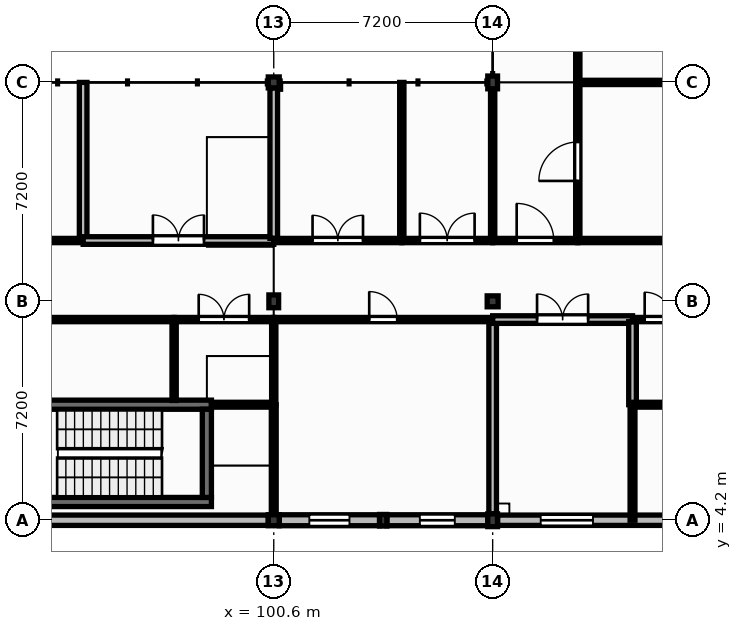
"""IFC4 building model, lengths in metres.
Left out: names, types, materials, properties, quantities, classifications, styles, units other than length and angle.
Written with IfcOpenShell. Run it as: python <this file> out.ifc"""

import sys

from ifc_helpers import new_model, si_unit, direction, frame, frame_2d, origin, origin_2d, place, context, subcontext, project, spatial, rectangle, extrude, element, fill, save


model = new_model("IFC4")
c1 = context("Model", 3, precision=1e-05, world=origin(), true_north=direction((0.0, 1.0)))
c2 = subcontext(c1, "Body", "Model", "MODEL_VIEW")
j1 = project(units=[si_unit("LENGTHUNIT", "METRE"), si_unit("PLANEANGLEUNIT", "RADIAN")], contexts=[c1])
p1 = place(None, origin())
s1 = spatial("IfcSite", under=j1, at=p1, CompositionType="ELEMENT")
p2 = place(p1, origin())
s2 = spatial("IfcBuilding", under=s1, at=p2, CompositionType="ELEMENT")
p3 = place(p2, frame((0.0, 0.0, 4.5)))
s3 = spatial("IfcBuildingStorey", under=s2, at=p3, CompositionType="ELEMENT", Elevation=4.5)
p4 = place(p3, frame((100.6, 4.2, 0.0), z_axis=(0.0, 0.0, 1.0), x_axis=(1.0, 0.0, 0.0)))
e1 = element("IfcColumn", 1, at=p4, inside=s3, PredefinedType="COLUMN", context=c2, shape_type="SweptSolid", body=[
    extrude(rectangle(XDim=0.36, YDim=0.36, at=origin_2d()), origin(), (0.0, 0.0, 1.0), 4.26),
])
p5 = place(p3, frame((100.6, 11.4, 0.0), z_axis=(0.0, 0.0, 1.0), x_axis=(1.0, 0.0, 0.0)))
e2 = element("IfcColumn", 2, at=p5, inside=s3, PredefinedType="COLUMN", context=c2, shape_type="SweptSolid", body=[
    extrude(rectangle(XDim=0.32, YDim=0.42, at=origin_2d()), origin(), (0.0, 0.0, 1.0), 4.26),
])
p6 = place(p3, frame((100.6, 18.6, 0.0), z_axis=(0.0, 0.0, 1.0), x_axis=(1.0, 0.0, 0.0)))
e3 = element("IfcColumn", 3, at=p6, inside=s3, PredefinedType="COLUMN", context=c2, shape_type="SweptSolid", body=[
    extrude(rectangle(XDim=0.36, YDim=0.36, at=origin_2d()), origin(), (0.0, 0.0, 1.0), 4.26),
])
p7 = place(p3, frame((107.8, 4.2, 0.0), z_axis=(0.0, 0.0, 1.0), x_axis=(1.0, 0.0, 0.0)))
e4 = element("IfcColumn", 4, at=p7, inside=s3, PredefinedType="COLUMN", context=c2, shape_type="SweptSolid", body=[
    extrude(rectangle(XDim=0.32, YDim=0.42, at=origin_2d()), origin(), (0.0, 0.0, 1.0), 4.26),
])
p8 = place(p3, frame((107.8, 11.4, 0.0), z_axis=(0.0, 0.0, 1.0), x_axis=(1.0, 0.0, 0.0)))
e5 = element("IfcColumn", 5, at=p8, inside=s3, PredefinedType="COLUMN", context=c2, shape_type="SweptSolid", body=[
    extrude(rectangle(XDim=0.36, YDim=0.36, at=origin_2d()), origin(), (0.0, 0.0, 1.0), 4.26),
])
p9 = place(p3, frame((107.8, 18.6, 0.0), z_axis=(0.0, 0.0, 1.0), x_axis=(1.0, 0.0, 0.0)))
e6 = element("IfcColumn", 6, at=p9, inside=s3, PredefinedType="COLUMN", context=c2, shape_type="SweptSolid", body=[
    extrude(rectangle(XDim=0.32, YDim=0.42, at=origin_2d()), origin(), (0.0, 0.0, 1.0), 4.26),
])
p10 = place(p3, frame((104.2, 4.2, 0.0), z_axis=(0.0, 0.0, 1.0), x_axis=(1.0, 0.0, 0.0)))
e7 = element("IfcColumn", 7, at=p10, inside=s3, PredefinedType="PILASTER", context=c2, shape_type="SweptSolid", body=[
    extrude(rectangle(XDim=0.24, YDim=0.38, at=origin_2d()), origin(), (0.0, 0.0, 1.0), 4.26),
])
p11 = place(p3, frame((91.16, 4.2, 0.0), z_axis=(0.0, 0.0, 1.0), x_axis=(1.0, 0.0, 0.0)))
e8 = element("IfcWall", 8, at=p11, inside=s3, PredefinedType="SOLIDWALL", context=c2, shape_type="SweptSolid", body=[
    extrude(rectangle(XDim=9.26, YDim=0.34, at=frame_2d((4.63, 0.0))), origin(), (0.0, 0.0, 1.0), 3.8),
])
p12 = place(p3, frame((100.78, 4.2, 0.0), z_axis=(0.0, 0.0, 1.0), x_axis=(1.0, 0.0, 0.0)))
e9 = element("IfcWall", 9, at=p12, inside=s3, PredefinedType="SOLIDWALL", context=c2, shape_type="SweptSolid", body=[
    extrude(rectangle(XDim=3.3, YDim=0.36, at=frame_2d((1.65, 0.0))), origin(), (0.0, 0.0, 1.0), 3.8),
])
p13 = place(p12, frame((0.99, 0.0, 1.5)))
e10 = element("IfcOpeningElement", 10, at=p13, cuts=e9, PredefinedType="OPENING", context=c2, shape_type="SweptSolid", body=[
    extrude(rectangle(XDim=1.32, YDim=1.25, at=frame_2d((0.66, 0.625))), frame((0.0, 0.19, 0.0), z_axis=(0.0, -1.0, 0.0), x_axis=(1.0, 0.0, 0.0)), (0.0, 0.0, 1.0), 0.38),
])
p14 = place(p3, frame((104.32, 4.2, 0.0), z_axis=(0.0, 0.0, 1.0), x_axis=(1.0, 0.0, 0.0)))
e11 = element("IfcWall", 11, at=p14, inside=s3, PredefinedType="SOLIDWALL", context=c2, shape_type="SweptSolid", body=[
    extrude(rectangle(XDim=3.32, YDim=0.36, at=frame_2d((1.66, 0.0))), origin(), (0.0, 0.0, 1.0), 3.8),
])
p15 = place(p14, frame((1.085, 0.0, 1.5)))
e12 = element("IfcOpeningElement", 12, at=p15, cuts=e11, PredefinedType="OPENING", context=c2, shape_type="SweptSolid", body=[
    extrude(rectangle(XDim=1.15, YDim=1.25, at=frame_2d((0.575, 0.625))), frame((0.0, 0.19, 0.0), z_axis=(0.0, -1.0, 0.0), x_axis=(1.0, 0.0, 0.0)), (0.0, 0.0, 1.0), 0.38),
])
p16 = place(p3, frame((107.96, 4.2, 0.0), z_axis=(0.0, 0.0, 1.0), x_axis=(1.0, 0.0, 0.0)))
e13 = element("IfcWall", 13, at=p16, inside=s3, PredefinedType="SOLIDWALL", context=c2, shape_type="SweptSolid", body=[
    extrude(rectangle(XDim=6.79, YDim=0.34, at=frame_2d((3.395, 0.0))), origin(), (0.0, 0.0, 1.0), 3.76),
])
p17 = place(p16, frame((1.42, 0.0, 1.0)))
e14 = element("IfcOpeningElement", 14, at=p17, cuts=e13, PredefinedType="OPENING", context=c2, shape_type="SweptSolid", body=[
    extrude(rectangle(XDim=1.72, YDim=2.2, at=frame_2d((0.86, 1.1))), frame((0.0, 0.18, 0.0), z_axis=(0.0, -1.0, 0.0), x_axis=(1.0, 0.0, 0.0)), (0.0, 0.0, 1.0), 0.36),
])
for number, where, z_axis, x_axis in (
    (15, (91.85, 4.8, 0.0), (0.0, 0.0, 1.0), (1.0, 0.0, 0.0)),
    (16, (91.85, 8.0, 0.0), (0.0, 0.0, 1.0), (1.0, 0.0, 0.0)),
):
    element("IfcWall", number, at=place(p3, frame(where, z_axis=z_axis, x_axis=x_axis)), inside=s3, PredefinedType="SHEAR", context=c2, shape_type="SweptSolid", body=[
        extrude(rectangle(XDim=6.7, YDim=0.3, at=frame_2d((3.35, 0.0))), origin(), (0.0, 0.0, 1.0), 4.25),
    ])
p18 = place(p3, frame((98.4, 4.95, 0.0), z_axis=(0.0, 0.0, 1.0), x_axis=(0.0, 1.0, 0.0)))
e17 = element("IfcWall", 17, at=p18, inside=s3, PredefinedType="SHEAR", context=c2, shape_type="SweptSolid", body=[
    extrude(rectangle(XDim=2.9, YDim=0.3, at=frame_2d((1.45, 0.0))), origin(), (0.0, 0.0, 1.0), 4.25),
])
p19 = place(p3, frame((91.0, 13.4, 0.0), z_axis=(0.0, 0.0, 1.0), x_axis=(1.0, 0.0, 0.0)))
e18 = element("IfcWall", 18, at=p19, inside=s3, PredefinedType="PARTITIONING", context=c2, shape_type="SweptSolid", body=[
    extrude(rectangle(XDim=3.331, YDim=0.14, at=frame_2d((1.666, 0.0))), origin(), (0.0, 0.0, 1.0), 4.18),
])
p20 = place(p19, frame((1.146, 0.0, 0.0)))
e19 = element("IfcOpeningElement", 19, at=p20, cuts=e18, PredefinedType="OPENING", context=c2, shape_type="SweptSolid", body=[
    extrude(rectangle(XDim=1.04, YDim=2.1, at=frame_2d((0.52, 1.05))), frame((0.0, 0.08, 0.0), z_axis=(0.0, -1.0, 0.0), x_axis=(1.0, 0.0, 0.0)), (0.0, 0.0, 1.0), 0.16),
])
p21 = place(p3, frame((92.0, 10.8, 0.0), z_axis=(0.0, 0.0, 1.0), x_axis=(1.0, 0.0, 0.0)))
e20 = element("IfcWall", 20, at=p21, inside=s3, PredefinedType="PARTITIONING", context=c2, shape_type="SweptSolid", body=[
    extrude(rectangle(XDim=5.323, YDim=0.14, at=frame_2d((2.662, 0.0))), origin(), (0.0, 0.0, 1.0), 4.18),
])
p22 = place(p3, frame((94.331, 13.47, 0.0), z_axis=(0.0, 0.0, 1.0), x_axis=(0.0, 1.0, 0.0)))
e21 = element("IfcWall", 21, at=p22, inside=s3, PredefinedType="SOLIDWALL", context=c2, shape_type="SweptSolid", body=[
    extrude(rectangle(XDim=5.13, YDim=0.25, at=frame_2d((2.565, 0.0))), origin(), (0.0, 0.0, 1.0), 4.18),
])
p23 = place(p3, frame((94.331, 13.4, 0.0), z_axis=(0.0, 0.0, 1.0), x_axis=(1.0, 0.0, 0.0)))
e22 = element("IfcWall", 22, at=p23, inside=s3, PredefinedType="SOLIDWALL", context=c2, shape_type="SweptSolid", body=[
    extrude(rectangle(XDim=6.269, YDim=0.25, at=frame_2d((3.135, 0.0))), origin(), (0.0, 0.0, 1.0), 4.18),
])
p24 = place(p23, frame((2.294, 0.0, 0.0)))
e23 = element("IfcOpeningElement", 23, at=p24, cuts=e22, PredefinedType="OPENING", context=c2, shape_type="SweptSolid", body=[
    extrude(rectangle(XDim=1.68, YDim=2.3, at=frame_2d((0.84, 1.15))), frame((0.0, 0.135, 0.0), z_axis=(0.0, -1.0, 0.0), x_axis=(1.0, 0.0, 0.0)), (0.0, 0.0, 1.0), 0.27),
])
p25 = place(p3, frame((97.323, 8.14, 0.0), z_axis=(0.0, 0.0, 1.0), x_axis=(0.0, 1.0, 0.0)))
e24 = element("IfcWall", 24, at=p25, inside=s3, PredefinedType="PARTITIONING", context=c2, shape_type="SweptSolid", body=[
    extrude(rectangle(XDim=2.59, YDim=0.14, at=frame_2d((1.295, 0.0))), origin(), (0.0, 0.0, 1.0), 4.18),
])
p26 = place(p3, frame((97.323, 10.8, 0.0), z_axis=(0.0, 0.0, 1.0), x_axis=(1.0, 0.0, 0.0)))
e25 = element("IfcWall", 25, at=p26, inside=s3, PredefinedType="PARTITIONING", context=c2, shape_type="SweptSolid", body=[
    extrude(rectangle(XDim=3.277, YDim=0.14, at=frame_2d((1.639, 0.0))), origin(), (0.0, 0.0, 1.0), 4.18),
])
p27 = place(p26, frame((0.809, 0.0, 0.0)))
e26 = element("IfcOpeningElement", 26, at=p27, cuts=e25, PredefinedType="OPENING", context=c2, shape_type="SweptSolid", body=[
    extrude(rectangle(XDim=1.66, YDim=2.3, at=frame_2d((0.83, 1.15))), frame((0.0, 0.08, 0.0), z_axis=(0.0, -1.0, 0.0), x_axis=(1.0, 0.0, 0.0)), (0.0, 0.0, 1.0), 0.16),
])
p28 = place(p3, frame((100.6, 8.0, 0.0), z_axis=(0.0, 0.0, 1.0), x_axis=(0.0, 1.0, 0.0)))
e27 = element("IfcWall", 27, at=p28, inside=s3, PredefinedType="PARTITIONING", context=c2, shape_type="SweptSolid", body=[
    extrude(rectangle(XDim=2.73, YDim=0.14, at=frame_2d((1.365, 0.0))), origin(), (0.0, 0.0, 1.0), 3.74),
])
p29 = place(p3, frame((100.6, 10.8, 0.0), z_axis=(0.0, 0.0, 1.0), x_axis=(1.0, 0.0, 0.0)))
e28 = element("IfcWall", 28, at=p29, inside=s3, PredefinedType="PARTITIONING", context=c2, shape_type="SweptSolid", body=[
    extrude(rectangle(XDim=7.2, YDim=0.14, at=frame_2d((3.6, 0.0))), origin(), (0.0, 0.0, 1.0), 4.18),
])
p30 = place(p29, frame((3.14, 0.0, 0.0)))
e29 = element("IfcOpeningElement", 29, at=p30, cuts=e28, PredefinedType="OPENING", context=c2, shape_type="SweptSolid", body=[
    extrude(rectangle(XDim=0.92, YDim=2.1, at=frame_2d((0.46, 1.05))), frame((0.0, 0.08, 0.0), z_axis=(0.0, -1.0, 0.0), x_axis=(1.0, 0.0, 0.0)), (0.0, 0.0, 1.0), 0.16),
])
p31 = place(p3, frame((100.6, 13.47, 0.0), z_axis=(0.0, 0.0, 1.0), x_axis=(0.0, 1.0, 0.0)))
e30 = element("IfcWall", 30, at=p31, inside=s3, PredefinedType="SOLIDWALL", context=c2, shape_type="SweptSolid", body=[
    extrude(rectangle(XDim=4.95, YDim=0.25, at=frame_2d((2.475, 0.0))), origin(), (0.0, 0.0, 1.0), 3.74),
])
p32 = place(p3, frame((100.6, 13.4, 0.0), z_axis=(0.0, 0.0, 1.0), x_axis=(1.0, 0.0, 0.0)))
e31 = element("IfcWall", 31, at=p32, inside=s3, PredefinedType="PARTITIONING", context=c2, shape_type="SweptSolid", body=[
    extrude(rectangle(XDim=4.212, YDim=0.14, at=frame_2d((2.106, 0.0))), origin(), (0.0, 0.0, 1.0), 4.18),
])
p33 = place(p32, frame((1.276, 0.0, 0.0)))
e32 = element("IfcOpeningElement", 32, at=p33, cuts=e31, PredefinedType="OPENING", context=c2, shape_type="SweptSolid", body=[
    extrude(rectangle(XDim=1.66, YDim=2.3, at=frame_2d((0.83, 1.15))), frame((0.0, 0.08, 0.0), z_axis=(0.0, -1.0, 0.0), x_axis=(1.0, 0.0, 0.0)), (0.0, 0.0, 1.0), 0.16),
])
p34 = place(p3, frame((104.812, 13.47, 0.0), z_axis=(0.0, 0.0, 1.0), x_axis=(0.0, 1.0, 0.0)))
e33 = element("IfcWall", 33, at=p34, inside=s3, PredefinedType="PARTITIONING", context=c2, shape_type="SweptSolid", body=[
    extrude(rectangle(XDim=5.13, YDim=0.14, at=frame_2d((2.565, 0.0))), origin(), (0.0, 0.0, 1.0), 4.18),
])
p35 = place(p3, frame((104.812, 13.4, 0.0), z_axis=(0.0, 0.0, 1.0), x_axis=(1.0, 0.0, 0.0)))
e34 = element("IfcWall", 34, at=p35, inside=s3, PredefinedType="PARTITIONING", context=c2, shape_type="SweptSolid", body=[
    extrude(rectangle(XDim=2.988, YDim=0.14, at=frame_2d((1.494, 0.0))), origin(), (0.0, 0.0, 1.0), 4.18),
])
p36 = place(p35, frame((0.594, 0.0, 0.0)))
e35 = element("IfcOpeningElement", 35, at=p36, cuts=e34, PredefinedType="OPENING", context=c2, shape_type="SweptSolid", body=[
    extrude(rectangle(XDim=1.8, YDim=2.3, at=frame_2d((0.9, 1.15))), frame((0.0, 0.08, 0.0), z_axis=(0.0, -1.0, 0.0), x_axis=(1.0, 0.0, 0.0)), (0.0, 0.0, 1.0), 0.16),
])
p37 = place(p3, frame((107.8, 4.41, 0.0), z_axis=(0.0, 0.0, 1.0), x_axis=(0.0, 1.0, 0.0)))
e36 = element("IfcWall", 36, at=p37, inside=s3, PredefinedType="SOLIDWALL", context=c2, shape_type="SweptSolid", body=[
    extrude(rectangle(XDim=6.32, YDim=0.25, at=frame_2d((3.16, 0.0))), origin(), (0.0, 0.0, 1.0), 3.74),
])
p38 = place(p3, frame((107.8, 10.8, 0.0), z_axis=(0.0, 0.0, 1.0), x_axis=(1.0, 0.0, 0.0)))
e37 = element("IfcWall", 37, at=p38, inside=s3, PredefinedType="SOLIDWALL", context=c2, shape_type="SweptSolid", body=[
    extrude(rectangle(XDim=4.6, YDim=0.25, at=frame_2d((2.3, 0.0))), origin(), (0.0, 0.0, 1.0), 4.18),
])
p39 = place(p38, frame((1.46, 0.0, 0.0)))
e38 = element("IfcOpeningElement", 38, at=p39, cuts=e37, PredefinedType="OPENING", context=c2, shape_type="SweptSolid", body=[
    extrude(rectangle(XDim=1.68, YDim=2.3, at=frame_2d((0.84, 1.15))), frame((0.0, 0.135, 0.0), z_axis=(0.0, -1.0, 0.0), x_axis=(1.0, 0.0, 0.0)), (0.0, 0.0, 1.0), 0.27),
])
p40 = place(p3, frame((107.8, 13.47, 0.0), z_axis=(0.0, 0.0, 1.0), x_axis=(0.0, 1.0, 0.0)))
e39 = element("IfcWall", 39, at=p40, inside=s3, PredefinedType="PARTITIONING", context=c2, shape_type="SweptSolid", body=[
    extrude(rectangle(XDim=4.92, YDim=0.14, at=frame_2d((2.46, 0.0))), origin(), (0.0, 0.0, 1.0), 3.74),
])
p41 = place(p3, frame((107.8, 13.4, 0.0), z_axis=(0.0, 0.0, 1.0), x_axis=(1.0, 0.0, 0.0)))
e40 = element("IfcWall", 40, at=p41, inside=s3, PredefinedType="PARTITIONING", context=c2, shape_type="SweptSolid", body=[
    extrude(rectangle(XDim=2.8, YDim=0.14, at=frame_2d((1.4, 0.0))), origin(), (0.0, 0.0, 1.0), 4.18),
])
p42 = place(p41, frame((0.79, 0.0, 0.0)))
e41 = element("IfcOpeningElement", 41, at=p42, cuts=e40, PredefinedType="OPENING", context=c2, shape_type="SweptSolid", body=[
    extrude(rectangle(XDim=1.22, YDim=2.1, at=frame_2d((0.61, 1.05))), frame((0.0, 0.08, 0.0), z_axis=(0.0, -1.0, 0.0), x_axis=(1.0, 0.0, 0.0)), (0.0, 0.0, 1.0), 0.16),
])
p43 = place(p3, frame((110.6, 13.47, 0.0), z_axis=(0.0, 0.0, 1.0), x_axis=(0.0, 1.0, 0.0)))
e42 = element("IfcWall", 42, at=p43, inside=s3, PredefinedType="PARTITIONING", context=c2, shape_type="SweptSolid", body=[
    extrude(rectangle(XDim=5.06, YDim=0.14, at=frame_2d((2.53, 0.0))), origin(), (0.0, 0.0, 1.0), 4.18),
])
p44 = place(p43, frame((1.89, 0.0, 0.0)))
e43 = element("IfcOpeningElement", 43, at=p44, cuts=e42, PredefinedType="OPENING", context=c2, shape_type="SweptSolid", body=[
    extrude(rectangle(XDim=1.28, YDim=2.2, at=frame_2d((0.64, 1.1))), frame((0.0, 0.08, 0.0), z_axis=(0.0, -1.0, 0.0), x_axis=(1.0, 0.0, 0.0)), (0.0, 0.0, 1.0), 0.16),
])
p45 = place(p3, frame((110.6, 13.4, 0.0), z_axis=(0.0, 0.0, 1.0), x_axis=(1.0, 0.0, 0.0)))
e44 = element("IfcWall", 44, at=p45, inside=s3, PredefinedType="PARTITIONING", context=c2, shape_type="SweptSolid", body=[
    extrude(rectangle(XDim=4.4, YDim=0.14, at=frame_2d((2.2, 0.0))), origin(), (0.0, 0.0, 1.0), 4.18),
])
p46 = place(p3, frame((110.6, 18.67, 0.0), z_axis=(0.0, 0.0, 1.0), x_axis=(0.0, 1.0, 0.0)))
e45 = element("IfcWall", 45, at=p46, inside=s3, PredefinedType="PARTITIONING", context=c2, shape_type="SweptSolid", body=[
    extrude(rectangle(XDim=8.46, YDim=0.14, at=frame_2d((4.23, 0.0))), origin(), (0.0, 0.0, 1.0), 4.18),
])
p47 = place(p46, frame((3.4, 0.0, 0.0)))
e46 = element("IfcOpeningElement", 46, at=p47, cuts=e45, PredefinedType="OPENING", context=c2, shape_type="SweptSolid", body=[
    extrude(rectangle(XDim=1.66, YDim=2.3, at=frame_2d((0.83, 1.15))), frame((0.0, 0.08, 0.0), z_axis=(0.0, -1.0, 0.0), x_axis=(1.0, 0.0, 0.0)), (0.0, 0.0, 1.0), 0.16),
])
p48 = place(p3, frame((110.6, 18.6, 0.0), z_axis=(0.0, 0.0, 1.0), x_axis=(1.0, 0.0, 0.0)))
e47 = element("IfcWall", 47, at=p48, inside=s3, PredefinedType="PARTITIONING", context=c2, shape_type="SweptSolid", body=[
    extrude(rectangle(XDim=4.15, YDim=0.14, at=frame_2d((2.075, 0.0))), origin(), (0.0, 0.0, 1.0), 3.76),
])
p49 = place(p3, frame((112.4, 8.0, 0.0), z_axis=(0.0, 0.0, 1.0), x_axis=(0.0, 1.0, 0.0)))
e48 = element("IfcWall", 48, at=p49, inside=s3, PredefinedType="SOLIDWALL", context=c2, shape_type="SweptSolid", body=[
    extrude(rectangle(XDim=2.73, YDim=0.25, at=frame_2d((1.365, 0.0))), origin(), (0.0, 0.0, 1.0), 4.18),
])
p50 = place(p3, frame((112.4, 10.8, 0.0), z_axis=(0.0, 0.0, 1.0), x_axis=(1.0, 0.0, 0.0)))
e49 = element("IfcWall", 49, at=p50, inside=s3, PredefinedType="PARTITIONING", context=c2, shape_type="SweptSolid", body=[
    extrude(rectangle(XDim=2.6, YDim=0.14, at=frame_2d((1.3, 0.0))), origin(), (0.0, 0.0, 1.0), 4.18),
])
p51 = place(p50, frame((0.4, 0.0, 0.0)))
e50 = element("IfcOpeningElement", 50, at=p51, cuts=e49, PredefinedType="OPENING", context=c2, shape_type="SweptSolid", body=[
    extrude(rectangle(XDim=1.8, YDim=2.3, at=frame_2d((0.9, 1.15))), frame((0.0, 0.08, 0.0), z_axis=(0.0, -1.0, 0.0), x_axis=(1.0, 0.0, 0.0)), (0.0, 0.0, 1.0), 0.16),
])
p52 = place(p3, frame((112.4, 8.0, 0.0), z_axis=(0.0, 0.0, 1.0), x_axis=(1.0, 0.0, 0.0)))
e51 = element("IfcWall", 51, at=p52, inside=s3, PredefinedType="PARTITIONING", context=c2, shape_type="SweptSolid", body=[
    extrude(rectangle(XDim=2.6, YDim=0.16, at=frame_2d((1.3, 0.0))), origin(), (0.0, 0.0, 1.0), 4.18),
])
p53 = place(p3, frame((98.55, 8.0, 0.0), z_axis=(0.0, 0.0, 1.0), x_axis=(1.0, 0.0, 0.0)))
e52 = element("IfcWall", 52, at=p53, inside=s3, PredefinedType="PARTITIONING", context=c2, shape_type="SweptSolid", body=[
    extrude(rectangle(XDim=2.05, YDim=0.16, at=frame_2d((1.025, 0.0))), origin(), (0.0, 0.0, 1.0), 4.18),
])
p54 = place(p3, frame((100.6, 4.38, 0.0), z_axis=(0.0, 0.0, 1.0), x_axis=(0.0, 1.0, 0.0)))
e53 = element("IfcWall", 53, at=p54, inside=s3, PredefinedType="PARTITIONING", context=c2, shape_type="SweptSolid", body=[
    extrude(rectangle(XDim=3.62, YDim=0.16, at=frame_2d((1.81, 0.0))), origin(), (0.0, 0.0, 1.0), 3.74),
])
p55 = place(p3, frame((112.4, 4.2, 0.0), z_axis=(0.0, 0.0, 1.0), x_axis=(0.0, 1.0, 0.0)))
e54 = element("IfcWall", 54, at=p55, inside=s3, PredefinedType="PARTITIONING", context=c2, shape_type="SweptSolid", body=[
    extrude(rectangle(XDim=3.8, YDim=0.16, at=frame_2d((1.9, 0.0))), origin(), (0.0, 0.0, 1.0), 4.18),
])
p56 = place(p13, origin())
e55 = element("IfcWindow", 55, at=p56, inside=s3, PartitioningType="SINGLE_PANEL", PredefinedType="WINDOW", context=c2, shape_type="SweptSolid", body=[
    extrude(rectangle(XDim=1.32, YDim=1.25, at=frame_2d((0.66, 0.625))), frame((0.0, 0.03, 0.0), z_axis=(0.0, -1.0, 0.0), x_axis=(1.0, 0.0, 0.0)), (0.0, 0.0, 1.0), 0.06),
])
fill(e10, e55)
p57 = place(p15, origin())
e56 = element("IfcWindow", 56, at=p57, inside=s3, PartitioningType="SINGLE_PANEL", PredefinedType="WINDOW", context=c2, shape_type="SweptSolid", body=[
    extrude(rectangle(XDim=1.15, YDim=1.25, at=frame_2d((0.575, 0.625))), frame((0.0, 0.03, 0.0), z_axis=(0.0, -1.0, 0.0), x_axis=(1.0, 0.0, 0.0)), (0.0, 0.0, 1.0), 0.06),
])
fill(e12, e56)
p58 = place(p17, origin())
e57 = element("IfcWindow", 57, at=p58, inside=s3, PartitioningType="DOUBLE_PANEL_VERTICAL", PredefinedType="WINDOW", context=c2, shape_type="SweptSolid", body=[
    extrude(rectangle(XDim=1.72, YDim=2.2, at=frame_2d((0.86, 1.1))), frame((0.0, 0.03, 0.0), z_axis=(0.0, -1.0, 0.0), x_axis=(1.0, 0.0, 0.0)), (0.0, 0.0, 1.0), 0.06),
])
fill(e14, e57)
p59 = place(p51, origin())
e58 = element("IfcDoor", 58, at=p59, inside=s3, OperationType="DOUBLE_DOOR_SINGLE_SWING", PredefinedType="DOOR", context=c2, shape_type="SweptSolid", body=[
    extrude(rectangle(XDim=1.8, YDim=2.3, at=frame_2d((0.9, 1.15))), frame((0.0, 0.025, 0.0), z_axis=(0.0, -1.0, 0.0), x_axis=(1.0, 0.0, 0.0)), (0.0, 0.0, 1.0), 0.05),
])
fill(e50, e58)
p60 = place(p42, origin())
e59 = element("IfcDoor", 59, at=p60, inside=s3, OperationType="SINGLE_SWING_LEFT", PredefinedType="DOOR", context=c2, shape_type="SweptSolid", body=[
    extrude(rectangle(XDim=1.22, YDim=2.1, at=frame_2d((0.61, 1.05))), frame((0.0, 0.025, 0.0), z_axis=(0.0, -1.0, 0.0), x_axis=(1.0, 0.0, 0.0)), (0.0, 0.0, 1.0), 0.05),
])
fill(e41, e59)
p61 = place(p27, origin())
e60 = element("IfcDoor", 60, at=p61, inside=s3, OperationType="DOUBLE_DOOR_SINGLE_SWING", PredefinedType="DOOR", context=c2, shape_type="SweptSolid", body=[
    extrude(rectangle(XDim=1.66, YDim=2.3, at=frame_2d((0.83, 1.15))), frame((0.0, 0.025, 0.0), z_axis=(0.0, -1.0, 0.0), x_axis=(1.0, 0.0, 0.0)), (0.0, 0.0, 1.0), 0.05),
])
fill(e26, e60)
p62 = place(p24, origin())
e61 = element("IfcDoor", 61, at=p62, inside=s3, OperationType="DOUBLE_DOOR_SINGLE_SWING", PredefinedType="DOOR", context=c2, shape_type="SweptSolid", body=[
    extrude(rectangle(XDim=1.68, YDim=2.3, at=frame_2d((0.84, 1.15))), frame((0.0, 0.025, 0.0), z_axis=(0.0, -1.0, 0.0), x_axis=(1.0, 0.0, 0.0)), (0.0, 0.0, 1.0), 0.05),
])
fill(e23, e61)
p63 = place(p30, origin())
e62 = element("IfcDoor", 62, at=p63, inside=s3, OperationType="SINGLE_SWING_LEFT", PredefinedType="DOOR", context=c2, shape_type="SweptSolid", body=[
    extrude(rectangle(XDim=0.92, YDim=2.1, at=frame_2d((0.46, 1.05))), frame((0.0, 0.025, 0.0), z_axis=(0.0, -1.0, 0.0), x_axis=(1.0, 0.0, 0.0)), (0.0, 0.0, 1.0), 0.05),
])
fill(e29, e62)
p64 = place(p33, origin())
e63 = element("IfcDoor", 63, at=p64, inside=s3, OperationType="DOUBLE_DOOR_SINGLE_SWING", PredefinedType="DOOR", context=c2, shape_type="SweptSolid", body=[
    extrude(rectangle(XDim=1.66, YDim=2.3, at=frame_2d((0.83, 1.15))), frame((0.0, 0.025, 0.0), z_axis=(0.0, -1.0, 0.0), x_axis=(1.0, 0.0, 0.0)), (0.0, 0.0, 1.0), 0.05),
])
fill(e32, e63)
p65 = place(p36, origin())
e64 = element("IfcDoor", 64, at=p65, inside=s3, OperationType="DOUBLE_DOOR_SINGLE_SWING", PredefinedType="DOOR", context=c2, shape_type="SweptSolid", body=[
    extrude(rectangle(XDim=1.8, YDim=2.3, at=frame_2d((0.9, 1.15))), frame((0.0, 0.025, 0.0), z_axis=(0.0, -1.0, 0.0), x_axis=(1.0, 0.0, 0.0)), (0.0, 0.0, 1.0), 0.05),
])
fill(e35, e64)
p66 = place(p39, origin())
e65 = element("IfcDoor", 65, at=p66, inside=s3, OperationType="DOUBLE_DOOR_SINGLE_SWING", PredefinedType="DOOR", context=c2, shape_type="SweptSolid", body=[
    extrude(rectangle(XDim=1.68, YDim=2.3, at=frame_2d((0.84, 1.15))), frame((0.0, 0.025, 0.0), z_axis=(0.0, -1.0, 0.0), x_axis=(1.0, 0.0, 0.0)), (0.0, 0.0, 1.0), 0.05),
])
fill(e38, e65)
p67 = place(p44, origin())
e66 = element("IfcDoor", 66, at=p67, inside=s3, OperationType="SINGLE_SWING_LEFT", PredefinedType="DOOR", context=c2, shape_type="SweptSolid", body=[
    extrude(rectangle(XDim=1.28, YDim=2.2, at=frame_2d((0.64, 1.1))), frame((0.0, 0.025, 0.0), z_axis=(0.0, -1.0, 0.0), x_axis=(1.0, 0.0, 0.0)), (0.0, 0.0, 1.0), 0.05),
])
fill(e43, e66)
save(model, sys.argv[1])
